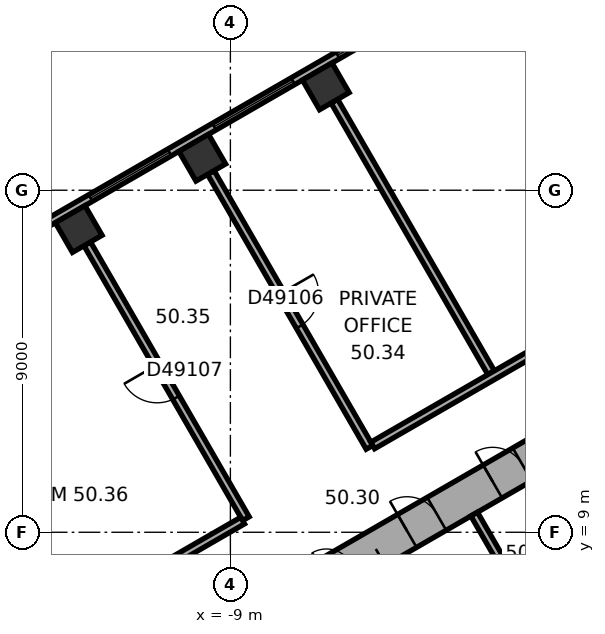
"""IFC4 building model, lengths in metres.
Left out: names, types, materials, properties, quantities, classifications, styles, units other than length and angle.
Written with IfcOpenShell. Run it as: python <this file> out.ifc"""

import sys

from ifc_helpers import new_model, si_unit, direction, frame, frame_2d, origin, origin_2d, place, context, subcontext, project, spatial, rectangle, extrude, element, fill, save


model = new_model("IFC4")
c1 = context("Model", 3, precision=1e-05, world=origin(), true_north=direction((0.0, 1.0)))
c2 = subcontext(c1, "Body", "Model", "MODEL_VIEW")
j1 = project(units=[si_unit("LENGTHUNIT", "METRE"), si_unit("PLANEANGLEUNIT", "RADIAN")], contexts=[c1])
p1 = place(None, origin())
s1 = spatial("IfcSite", under=j1, at=p1, CompositionType="ELEMENT")
p2 = place(p1, origin())
s2 = spatial("IfcBuilding", under=s1, at=p2, CompositionType="ELEMENT")
p3 = place(p2, frame((0.0, 0.0, 202.1)))
s3 = spatial("IfcBuildingStorey", under=s2, at=p3, CompositionType="ELEMENT", Elevation=202.1)
for number, where, z_axis, x_axis in (
    (1, (-6.489, 20.733, 0.0), (0.0, 0.0, 1.0), (-0.866, -0.5, 0.0)),
    (2, (-9.74, 18.856, 0.0), (0.0, 0.0, 1.0), (-0.866, -0.5, 0.0)),
    (3, (-12.991, 16.979, 0.0), (0.0, 0.0, 1.0), (-0.866, -0.5, 0.0)),
):
    element("IfcColumn", number, at=place(p3, frame(where, z_axis=z_axis, x_axis=x_axis)), inside=s3, PredefinedType="COLUMN", context=c2, shape_type="SweptSolid", body=[
        extrude(rectangle(XDim=0.9, YDim=0.9, at=origin_2d()), origin(), (0.0, 0.0, 1.0), 3.7),
    ])
p4 = place(p3, frame((0.25, 11.691, 0.0), z_axis=(0.0, 0.0, 1.0), x_axis=(-0.866022616891, -0.50000482701, 0.0)))
e4 = element("IfcWall", 4, at=p4, inside=s3, PredefinedType="SHEAR", context=c2, shape_type="SweptSolid", body=[
    extrude(rectangle(XDim=12.125, YDim=1.0, at=frame_2d((6.062, 0.0))), origin(), (0.0, 0.0, 1.0), 3.7),
])
p5 = place(p4, frame((6.262, 0.0, 0.0)))
e5 = element("IfcOpeningElement", 5, at=p5, cuts=e4, PredefinedType="OPENING", context=c2, shape_type="SweptSolid", body=[
    extrude(rectangle(XDim=1.5, YDim=2.1, at=frame_2d((0.75, 1.05))), frame((0.0, 0.51, 0.0), z_axis=(0.0, -1.0, 0.0), x_axis=(1.0, 0.0, 0.0)), (0.0, 0.0, 1.0), 1.02),
])
p6 = place(p4, frame((1.812, 0.0, 0.0)))
e6 = element("IfcOpeningElement", 6, at=p6, cuts=e4, PredefinedType="OPENING", context=c2, shape_type="SweptSolid", body=[
    extrude(rectangle(XDim=0.9, YDim=2.1, at=frame_2d((0.45, 1.05))), frame((0.0, 0.51, 0.0), z_axis=(0.0, -1.0, 0.0), x_axis=(1.0, 0.0, 0.0)), (0.0, 0.0, 1.0), 1.02),
])
p7 = place(p4, frame((4.412, 0.0, 0.0)))
e7 = element("IfcOpeningElement", 7, at=p7, cuts=e4, PredefinedType="OPENING", context=c2, shape_type="SweptSolid", body=[
    extrude(rectangle(XDim=0.9, YDim=2.1, at=frame_2d((0.45, 1.05))), frame((0.0, 0.51, 0.0), z_axis=(0.0, -1.0, 0.0), x_axis=(1.0, 0.0, 0.0)), (0.0, 0.0, 1.0), 1.02),
])
p8 = place(p3, frame((-2.961, 23.405, 0.0), z_axis=(0.0, 0.0, 1.0), x_axis=(-0.866023315909, -0.500003616288, 0.0)))
e8 = element("IfcWall", 8, at=p8, inside=s3, PredefinedType="STANDARD", context=c2, shape_type="SweptSolid", body=[
    extrude(rectangle(XDim=20.044, YDim=0.2, at=frame_2d((10.022, 0.0))), origin(), (0.0, 0.0, 1.0), 3.7),
])
p9 = place(p8, frame((1.314, 0.0, 0.9)))
e9 = element("IfcOpeningElement", 9, at=p9, cuts=e8, PredefinedType="OPENING", context=c2, shape_type="SweptSolid", body=[
    extrude(rectangle(XDim=2.4, YDim=2.0, at=frame_2d((1.2, 1.0))), frame((0.0, 0.11, 0.0), z_axis=(0.0, -1.0, 0.0), x_axis=(1.0, 0.0, 0.0)), (0.0, 0.0, 1.0), 0.22),
])
p10 = place(p8, frame((5.069, 0.0, 0.9)))
e10 = element("IfcOpeningElement", 10, at=p10, cuts=e8, PredefinedType="OPENING", context=c2, shape_type="SweptSolid", body=[
    extrude(rectangle(XDim=2.4, YDim=2.0, at=frame_2d((1.2, 1.0))), frame((0.0, 0.11, 0.0), z_axis=(0.0, -1.0, 0.0), x_axis=(1.0, 0.0, 0.0)), (0.0, 0.0, 1.0), 0.22),
])
p11 = place(p8, frame((8.823, 0.0, 0.9)))
e11 = element("IfcOpeningElement", 11, at=p11, cuts=e8, PredefinedType="OPENING", context=c2, shape_type="SweptSolid", body=[
    extrude(rectangle(XDim=2.4, YDim=2.0, at=frame_2d((1.2, 1.0))), frame((0.0, 0.11, 0.0), z_axis=(0.0, -1.0, 0.0), x_axis=(1.0, 0.0, 0.0)), (0.0, 0.0, 1.0), 0.22),
])
p12 = place(p8, frame((12.577, 0.0, 0.9)))
e12 = element("IfcOpeningElement", 12, at=p12, cuts=e8, PredefinedType="OPENING", context=c2, shape_type="SweptSolid", body=[
    extrude(rectangle(XDim=2.4, YDim=2.0, at=frame_2d((1.2, 1.0))), frame((0.0, 0.11, 0.0), z_axis=(0.0, -1.0, 0.0), x_axis=(1.0, 0.0, 0.0)), (0.0, 0.0, 1.0), 0.22),
])
p13 = place(p8, frame((16.331, 0.0, 0.9)))
e13 = element("IfcOpeningElement", 13, at=p13, cuts=e8, PredefinedType="OPENING", context=c2, shape_type="SweptSolid", body=[
    extrude(rectangle(XDim=2.4, YDim=2.0, at=frame_2d((1.2, 1.0))), frame((0.0, 0.11, 0.0), z_axis=(0.0, -1.0, 0.0), x_axis=(1.0, 0.0, 0.0)), (0.0, 0.0, 1.0), 0.22),
])
p14 = place(p3, frame((0.803, 9.009, 0.0), z_axis=(0.0, 0.0, 1.0), x_axis=(-0.866028230842, -0.499995103361, 0.0)))
e14 = element("IfcWall", 14, at=p14, inside=s3, PredefinedType="PARTITIONING", context=c2, shape_type="SweptSolid", body=[
    extrude(rectangle(XDim=5.4, YDim=0.2, at=frame_2d((2.7, 0.0))), origin(), (0.0, 0.0, 1.0), 3.35),
])
p15 = place(p3, frame((-1.485, 7.572, 0.0), z_axis=(0.0, 0.0, 1.0), x_axis=(-0.50002983664, 0.866008176907, 0.0)))
e15 = element("IfcWall", 15, at=p15, inside=s3, PredefinedType="PARTITIONING", context=c2, shape_type="SweptSolid", body=[
    extrude(rectangle(XDim=2.2, YDim=0.2, at=frame_2d((1.1, 0.0))), origin(), (0.0, 0.0, 1.0), 3.35),
])
p16 = place(p3, frame((-2.216, 4.282, 0.0), z_axis=(0.0, 0.0, 1.0), x_axis=(0.499977259774, 0.866038532462, 0.0)))
e16 = element("IfcWall", 16, at=p16, inside=s3, PredefinedType="SHEAR", context=c2, shape_type="SweptSolid", body=[
    extrude(rectangle(XDim=4.7, YDim=0.3, at=frame_2d((2.35, 0.0))), origin(), (0.0, 0.0, 1.0), 3.35),
])
p17 = place(p3, frame((-12.766, 16.589, 0.0), z_axis=(0.0, 0.0, 1.0), x_axis=(0.500010139422, -0.866019549707, 0.0)))
e17 = element("IfcWall", 17, at=p17, inside=s3, PredefinedType="PARTITIONING", context=c2, shape_type="SweptSolid", body=[
    extrude(rectangle(XDim=8.35, YDim=0.2, at=frame_2d((4.175, 0.0))), origin(), (0.0, 0.0, 1.0), 3.35),
])
p18 = place(p17, frame((3.675, 0.0, 0.0)))
e18 = element("IfcOpeningElement", 18, at=p18, cuts=e17, PredefinedType="OPENING", context=c2, shape_type="SweptSolid", body=[
    extrude(rectangle(XDim=1.0, YDim=2.1, at=frame_2d((0.5, 1.05))), frame((0.0, 0.11, 0.0), z_axis=(0.0, -1.0, 0.0), x_axis=(1.0, 0.0, 0.0)), (0.0, 0.0, 1.0), 0.22),
])
p19 = place(p3, frame((-9.515, 18.466, 0.0), z_axis=(0.0, 0.0, 1.0), x_axis=(0.500010139422, -0.866019549707, 0.0)))
e19 = element("IfcWall", 19, at=p19, inside=s3, PredefinedType="PARTITIONING", context=c2, shape_type="SweptSolid", body=[
    extrude(rectangle(XDim=8.35, YDim=0.2, at=frame_2d((4.175, 0.0))), origin(), (0.0, 0.0, 1.0), 2.55),
])
p20 = place(p19, frame((3.675, 0.0, 0.0)))
e20 = element("IfcOpeningElement", 20, at=p20, cuts=e19, PredefinedType="OPENING", context=c2, shape_type="SweptSolid", body=[
    extrude(rectangle(XDim=1.0, YDim=2.1, at=frame_2d((0.5, 1.05))), frame((0.0, 0.11, 0.0), z_axis=(0.0, -1.0, 0.0), x_axis=(1.0, 0.0, 0.0)), (0.0, 0.0, 1.0), 0.22),
])
p21 = place(p3, frame((-8.678, 9.308, 0.0), z_axis=(0.0, 0.0, 1.0), x_axis=(-0.866000359435, -0.500043375578, 0.0)))
e21 = element("IfcWall", 21, at=p21, inside=s3, PredefinedType="PARTITIONING", context=c2, shape_type="SweptSolid", body=[
    extrude(rectangle(XDim=3.161, YDim=0.2, at=frame_2d((1.581, 0.0))), origin(), (0.0, 0.0, 1.0), 3.35),
])
p22 = place(p3, frame((-6.264, 20.344, 0.0), z_axis=(0.0, 0.0, 1.0), x_axis=(0.499996545922, -0.866027397988, 0.0)))
e22 = element("IfcWall", 22, at=p22, inside=s3, PredefinedType="PARTITIONING", context=c2, shape_type="SweptSolid", body=[
    extrude(rectangle(XDim=8.25, YDim=0.2, at=frame_2d((4.125, 0.0))), origin(), (0.0, 0.0, 1.0), 3.35),
])
p23 = place(p3, frame((-0.95, 13.77, 0.0), z_axis=(0.0, 0.0, 1.0), x_axis=(-0.866036689987, -0.499980451214, 0.0)))
e23 = element("IfcWall", 23, at=p23, inside=s3, PredefinedType="PARTITIONING", context=c2, shape_type="SweptSolid", body=[
    extrude(rectangle(XDim=4.969, YDim=0.2, at=frame_2d((2.485, 0.0))), origin(), (0.0, 0.0, 1.0), 3.35),
])
p24 = place(p9, origin())
e24 = element("IfcWindow", 24, at=p24, inside=s3, PartitioningType="SINGLE_PANEL", PredefinedType="WINDOW", context=c2, shape_type="SweptSolid", body=[
    extrude(rectangle(XDim=2.4, YDim=2.0, at=frame_2d((1.2, 1.0))), frame((0.0, 0.03, 0.0), z_axis=(0.0, -1.0, 0.0), x_axis=(1.0, 0.0, 0.0)), (0.0, 0.0, 1.0), 0.06),
])
fill(e9, e24)
p25 = place(p10, origin())
e25 = element("IfcWindow", 25, at=p25, inside=s3, PartitioningType="SINGLE_PANEL", PredefinedType="WINDOW", context=c2, shape_type="SweptSolid", body=[
    extrude(rectangle(XDim=2.4, YDim=2.0, at=frame_2d((1.2, 1.0))), frame((0.0, 0.03, 0.0), z_axis=(0.0, -1.0, 0.0), x_axis=(1.0, 0.0, 0.0)), (0.0, 0.0, 1.0), 0.06),
])
fill(e10, e25)
p26 = place(p11, origin())
e26 = element("IfcWindow", 26, at=p26, inside=s3, PartitioningType="SINGLE_PANEL", PredefinedType="WINDOW", context=c2, shape_type="SweptSolid", body=[
    extrude(rectangle(XDim=2.4, YDim=2.0, at=frame_2d((1.2, 1.0))), frame((0.0, 0.03, 0.0), z_axis=(0.0, -1.0, 0.0), x_axis=(1.0, 0.0, 0.0)), (0.0, 0.0, 1.0), 0.06),
])
fill(e11, e26)
p27 = place(p5, origin())
e27 = element("IfcDoor", 27, at=p27, inside=s3, OperationType="DOUBLE_DOOR_SINGLE_SWING", PredefinedType="DOOR", context=c2, shape_type="SweptSolid", body=[
    extrude(rectangle(XDim=1.5, YDim=2.1, at=frame_2d((0.75, 1.05))), frame((0.0, 0.025, 0.0), z_axis=(0.0, -1.0, 0.0), x_axis=(1.0, 0.0, 0.0)), (0.0, 0.0, 1.0), 0.05),
])
fill(e5, e27)
p28 = place(p6, origin())
e28 = element("IfcDoor", 28, at=p28, inside=s3, OperationType="SINGLE_SWING_LEFT", PredefinedType="DOOR", context=c2, shape_type="SweptSolid", body=[
    extrude(rectangle(XDim=0.9, YDim=2.1, at=frame_2d((0.45, 1.05))), frame((0.0, 0.025, 0.0), z_axis=(0.0, -1.0, 0.0), x_axis=(1.0, 0.0, 0.0)), (0.0, 0.0, 1.0), 0.05),
])
fill(e6, e28)
p29 = place(p7, origin())
e29 = element("IfcDoor", 29, at=p29, inside=s3, OperationType="SINGLE_SWING_LEFT", PredefinedType="DOOR", context=c2, shape_type="SweptSolid", body=[
    extrude(rectangle(XDim=0.9, YDim=2.1, at=frame_2d((0.45, 1.05))), frame((0.0, 0.025, 0.0), z_axis=(0.0, -1.0, 0.0), x_axis=(1.0, 0.0, 0.0)), (0.0, 0.0, 1.0), 0.05),
])
fill(e7, e29)
p30 = place(p20, origin())
e30 = element("IfcDoor", 30, at=p30, inside=s3, OperationType="SINGLE_SWING_LEFT", PredefinedType="DOOR", context=c2, shape_type="SweptSolid", body=[
    extrude(rectangle(XDim=1.0, YDim=2.1, at=frame_2d((0.5, 1.05))), frame((0.0, 0.025, 0.0), z_axis=(0.0, -1.0, 0.0), x_axis=(1.0, 0.0, 0.0)), (0.0, 0.0, 1.0), 0.05),
])
fill(e20, e30)
p31 = place(p18, origin())
e31 = element("IfcDoor", 31, at=p31, inside=s3, OperationType="SINGLE_SWING_LEFT", PredefinedType="DOOR", context=c2, shape_type="SweptSolid", body=[
    extrude(rectangle(XDim=1.0, YDim=2.1, at=frame_2d((0.5, 1.05))), frame((0.0, 0.025, 0.0), z_axis=(0.0, -1.0, 0.0), x_axis=(1.0, 0.0, 0.0)), (0.0, 0.0, 1.0), 0.05),
])
fill(e18, e31)
save(model, sys.argv[1])
